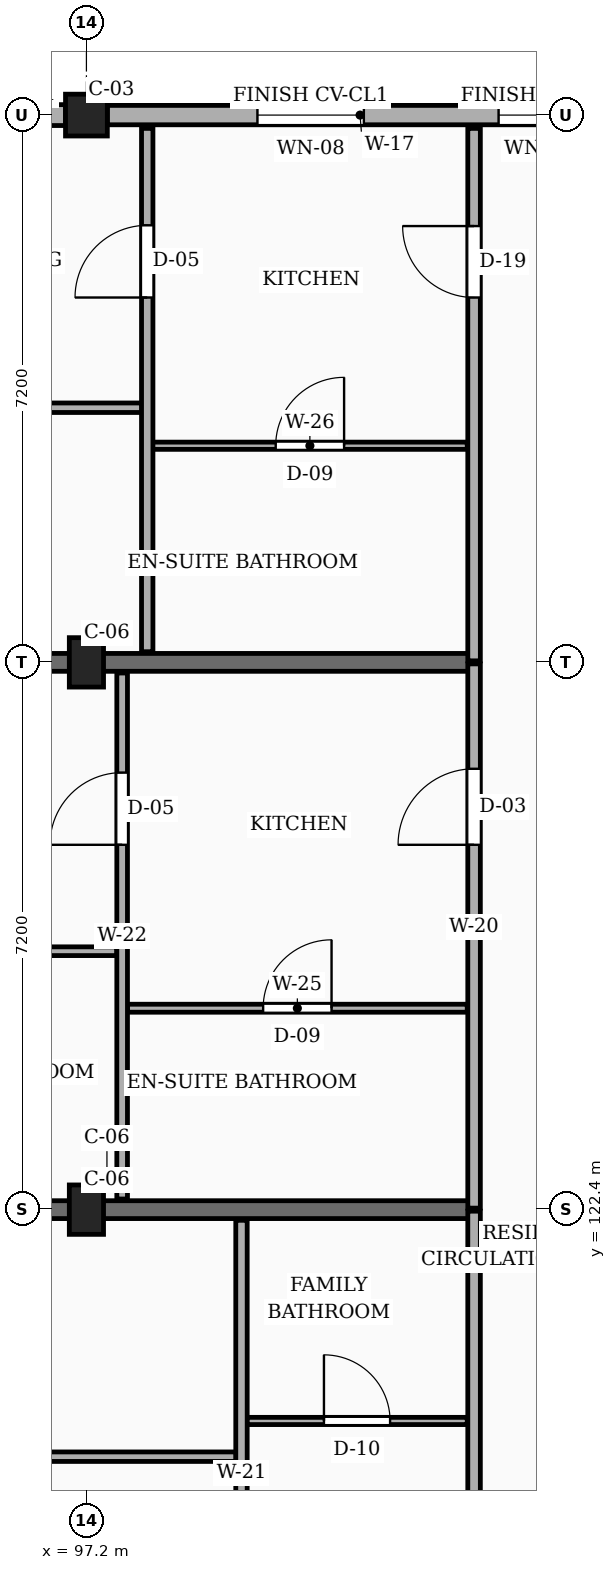
"""IFC4 building model, lengths in metres.
Left out: names, types, materials, properties, quantities, classifications, styles, units other than length and angle.
Written with IfcOpenShell. Run it as: python <this file> out.ifc"""

import sys

from ifc_helpers import new_model, si_unit, direction, frame, frame_2d, origin, origin_2d, place, context, subcontext, project, spatial, rectangle, extrude, element, fill, save


model = new_model("IFC4")
c1 = context("Model", 3, precision=1e-05, world=origin(), true_north=direction((0.0, 1.0)))
c2 = subcontext(c1, "Body", "Model", "MODEL_VIEW")
j1 = project(units=[si_unit("LENGTHUNIT", "METRE"), si_unit("PLANEANGLEUNIT", "RADIAN")], contexts=[c1])
p1 = place(None, origin())
s1 = spatial("IfcSite", under=j1, at=p1, CompositionType="ELEMENT")
p2 = place(p1, origin())
s2 = spatial("IfcBuilding", under=s1, at=p2, CompositionType="ELEMENT")
p3 = place(p2, frame((0.0, 0.0, 13.95)))
s3 = spatial("IfcBuildingStorey", under=s2, at=p3, CompositionType="ELEMENT", Elevation=13.95)
for number, where, z_axis, x_axis in (
    (1, (97.2, 122.4, 0.0), (0.0, 0.0, 1.0), (1.0, 0.0, 0.0)),
    (2, (97.2, 129.6, 0.0), (0.0, 0.0, 1.0), (1.0, 0.0, 0.0)),
):
    element("IfcColumn", number, at=place(p3, frame(where, z_axis=z_axis, x_axis=x_axis)), inside=s3, PredefinedType="COLUMN", context=c2, shape_type="SweptSolid", body=[
        extrude(rectangle(XDim=0.45, YDim=0.65, at=origin_2d()), origin(), (0.0, 0.0, 1.0), 3.15),
    ])
p4 = place(p3, frame((97.2, 136.8, 0.0), z_axis=(0.0, 0.0, 1.0), x_axis=(1.0, 0.0, 0.0)))
e3 = element("IfcColumn", 3, at=p4, inside=s3, PredefinedType="COLUMN", context=c2, shape_type="SweptSolid", body=[
    extrude(rectangle(XDim=0.55, YDim=0.55, at=origin_2d()), origin(), (0.0, 0.0, 1.0), 3.15),
])
for number, where, z_axis, x_axis in (
    (4, (90.275, 122.4, 0.0), (0.0, 0.0, 1.0), (1.0, 0.0, 0.0)),
    (5, (90.275, 129.6, 0.0), (0.0, 0.0, 1.0), (1.0, 0.0, 0.0)),
):
    element("IfcWall", number, at=place(p3, frame(where, z_axis=z_axis, x_axis=x_axis)), inside=s3, PredefinedType="SOLIDWALL", context=c2, shape_type="SweptSolid", body=[
        extrude(rectangle(XDim=12.025, YDim=0.235, at=frame_2d((6.013, 0.0))), origin(), (0.0, 0.0, 1.0), 2.19),
    ])
p5 = place(p3, frame((104.125, 136.8, 0.0), z_axis=(0.0, 0.0, 1.0), x_axis=(-1.0, 0.0, 0.0)))
e6 = element("IfcWall", 6, at=p5, inside=s3, PredefinedType="SOLIDWALL", context=c2, shape_type="SweptSolid", body=[
    extrude(rectangle(XDim=6.65, YDim=0.255, at=frame_2d((3.325, 0.0))), origin(), (0.0, 0.0, 1.0), 2.46),
])
p6 = place(p5, frame((0.462, 0.0, 0.78)))
e7 = element("IfcOpeningElement", 7, at=p6, cuts=e6, PredefinedType="OPENING", context=c2, shape_type="SweptSolid", body=[
    extrude(rectangle(XDim=1.04, YDim=1.26, at=frame_2d((0.52, 0.63))), frame((0.0, 0.137, 0.0), z_axis=(0.0, -1.0, 0.0), x_axis=(1.0, 0.0, 0.0)), (0.0, 0.0, 1.0), 0.275),
])
p7 = place(p5, frame((3.275, 0.0, 0.78)))
e8 = element("IfcOpeningElement", 8, at=p7, cuts=e6, PredefinedType="OPENING", context=c2, shape_type="SweptSolid", body=[
    extrude(rectangle(XDim=1.4, YDim=1.15, at=frame_2d((0.7, 0.575))), frame((0.0, 0.137, 0.0), z_axis=(0.0, -1.0, 0.0), x_axis=(1.0, 0.0, 0.0)), (0.0, 0.0, 1.0), 0.275),
])
p8 = place(p3, frame((96.925, 136.8, 0.0), z_axis=(0.0, 0.0, 1.0), x_axis=(-1.0, 0.0, 0.0)))
e9 = element("IfcWall", 9, at=p8, inside=s3, PredefinedType="SOLIDWALL", context=c2, shape_type="SweptSolid", body=[
    extrude(rectangle(XDim=6.65, YDim=0.275, at=frame_2d((3.325, 0.0))), origin(), (0.0, 0.0, 1.0), 2.46),
])
p9 = place(p8, frame((0.45, 0.0, 0.78)))
e10 = element("IfcOpeningElement", 10, at=p9, cuts=e9, PredefinedType="OPENING", context=c2, shape_type="SweptSolid", body=[
    extrude(rectangle(XDim=1.4, YDim=1.15, at=frame_2d((0.7, 0.575))), frame((0.0, 0.147, 0.0), z_axis=(0.0, -1.0, 0.0), x_axis=(1.0, 0.0, 0.0)), (0.0, 0.0, 1.0), 0.295),
])
p10 = place(p8, frame((4.65, 0.0, 0.78)))
e11 = element("IfcOpeningElement", 11, at=p10, cuts=e9, PredefinedType="OPENING", context=c2, shape_type="SweptSolid", body=[
    extrude(rectangle(XDim=0.96, YDim=1.26, at=frame_2d((0.48, 0.63))), frame((0.0, 0.147, 0.0), z_axis=(0.0, -1.0, 0.0), x_axis=(1.0, 0.0, 0.0)), (0.0, 0.0, 1.0), 0.295),
])
p11 = place(p3, frame((102.3, 115.22, 0.0), z_axis=(0.0, 0.0, 1.0), x_axis=(0.0, 1.0, 0.0)))
e12 = element("IfcWall", 12, at=p11, inside=s3, PredefinedType="PARTITIONING", context=c2, shape_type="SweptSolid", body=[
    extrude(rectangle(XDim=7.16, YDim=0.165, at=frame_2d((3.58, 0.0))), origin(), (0.0, 0.0, 1.0), 2.325),
])
p12 = place(p11, frame((1.33, 0.0, 0.0)))
e13 = element("IfcOpeningElement", 13, at=p12, cuts=e12, PredefinedType="OPENING", context=c2, shape_type="SweptSolid", body=[
    extrude(rectangle(XDim=1.14, YDim=2.18, at=frame_2d((0.57, 1.09))), frame((0.0, 0.093, 0.0), z_axis=(0.0, -1.0, 0.0), x_axis=(1.0, 0.0, 0.0)), (0.0, 0.0, 1.0), 0.185),
])
p13 = place(p3, frame((102.3, 122.42, 0.0), z_axis=(0.0, 0.0, 1.0), x_axis=(0.0, 1.0, 0.0)))
e14 = element("IfcWall", 14, at=p13, inside=s3, PredefinedType="PARTITIONING", context=c2, shape_type="SweptSolid", body=[
    extrude(rectangle(XDim=7.16, YDim=0.165, at=frame_2d((3.58, 0.0))), origin(), (0.0, 0.0, 1.0), 2.325),
])
p14 = place(p13, frame((4.78, 0.0, 0.0)))
e15 = element("IfcOpeningElement", 15, at=p14, cuts=e14, PredefinedType="OPENING", context=c2, shape_type="SweptSolid", body=[
    extrude(rectangle(XDim=1.0, YDim=2.15, at=frame_2d((0.5, 1.075))), frame((0.0, 0.093, 0.0), z_axis=(0.0, -1.0, 0.0), x_axis=(1.0, 0.0, 0.0)), (0.0, 0.0, 1.0), 0.185),
])
p15 = place(p3, frame((102.3, 129.62, 0.0), z_axis=(0.0, 0.0, 1.0), x_axis=(0.0, 1.0, 0.0)))
e16 = element("IfcWall", 16, at=p15, inside=s3, PredefinedType="PARTITIONING", context=c2, shape_type="SweptSolid", body=[
    extrude(rectangle(XDim=7.005, YDim=0.165, at=frame_2d((3.502, 0.0))), origin(), (0.0, 0.0, 1.0), 2.325),
])
p16 = place(p15, frame((4.78, 0.0, 0.0)))
e17 = element("IfcOpeningElement", 17, at=p16, cuts=e16, PredefinedType="OPENING", context=c2, shape_type="SweptSolid", body=[
    extrude(rectangle(XDim=0.94, YDim=2.12, at=frame_2d((0.47, 1.06))), frame((0.0, 0.093, 0.0), z_axis=(0.0, -1.0, 0.0), x_axis=(1.0, 0.0, 0.0)), (0.0, 0.0, 1.0), 0.185),
])
p17 = place(p3, frame((90.175, 119.15, 0.0), z_axis=(0.0, 0.0, 1.0), x_axis=(1.0, 0.0, 0.0)))
e18 = element("IfcWall", 18, at=p17, inside=s3, PredefinedType="PARTITIONING", context=c2, shape_type="SweptSolid", body=[
    extrude(rectangle(XDim=8.995, YDim=0.125, at=frame_2d((4.498, 0.0))), origin(), (0.0, 0.0, 1.0), 2.325),
])
p18 = place(p17, frame((4.058, 0.0, 0.0)))
e19 = element("IfcOpeningElement", 19, at=p18, cuts=e18, PredefinedType="OPENING", context=c2, shape_type="SweptSolid", body=[
    extrude(rectangle(XDim=0.88, YDim=2.08, at=frame_2d((0.44, 1.04))), frame((0.0, 0.073, 0.0), z_axis=(0.0, -1.0, 0.0), x_axis=(1.0, 0.0, 0.0)), (0.0, 0.0, 1.0), 0.145),
])
p19 = place(p3, frame((99.31, 119.62, 0.0), z_axis=(0.0, 0.0, 1.0), x_axis=(1.0, 0.0, 0.0)))
e20 = element("IfcWall", 20, at=p19, inside=s3, PredefinedType="PARTITIONING", context=c2, shape_type="SweptSolid", body=[
    extrude(rectangle(XDim=2.9, YDim=0.095, at=frame_2d((1.45, 0.0))), origin(), (0.0, 0.0, 1.0), 2.325),
])
p20 = place(p19, frame((1.015, 0.0, 0.0)))
e21 = element("IfcOpeningElement", 21, at=p20, cuts=e20, PredefinedType="OPENING", context=c2, shape_type="SweptSolid", body=[
    extrude(rectangle(XDim=0.87, YDim=2.05, at=frame_2d((0.435, 1.025))), frame((0.0, 0.058, 0.0), z_axis=(0.0, -1.0, 0.0), x_axis=(1.0, 0.0, 0.0)), (0.0, 0.0, 1.0), 0.115),
])
p21 = place(p3, frame((99.24, 115.34, 0.0), z_axis=(0.0, 0.0, 1.0), x_axis=(0.0, 1.0, 0.0)))
e22 = element("IfcWall", 22, at=p21, inside=s3, PredefinedType="PARTITIONING", context=c2, shape_type="SweptSolid", body=[
    extrude(rectangle(XDim=6.92, YDim=0.15, at=frame_2d((3.46, 0.0))), origin(), (0.0, 0.0, 1.0), 2.325),
])
p22 = place(p21, frame((1.31, 0.0, 0.0)))
e23 = element("IfcOpeningElement", 23, at=p22, cuts=e22, PredefinedType="OPENING", context=c2, shape_type="SweptSolid", body=[
    extrude(rectangle(XDim=0.92, YDim=2.1, at=frame_2d((0.46, 1.05))), frame((0.0, 0.085, 0.0), z_axis=(0.0, -1.0, 0.0), x_axis=(1.0, 0.0, 0.0)), (0.0, 0.0, 1.0), 0.17),
])
p23 = place(p3, frame((90.175, 125.8, 0.0), z_axis=(0.0, 0.0, 1.0), x_axis=(1.0, 0.0, 0.0)))
e24 = element("IfcWall", 24, at=p23, inside=s3, PredefinedType="PARTITIONING", context=c2, shape_type="SweptSolid", body=[
    extrude(rectangle(XDim=7.425, YDim=0.115, at=frame_2d((3.712, 0.0))), origin(), (0.0, 0.0, 1.0), 2.325),
])
p24 = place(p23, frame((3.262, 0.0, 0.0)))
e25 = element("IfcOpeningElement", 25, at=p24, cuts=e24, PredefinedType="OPENING", context=c2, shape_type="SweptSolid", body=[
    extrude(rectangle(XDim=0.9, YDim=2.1, at=frame_2d((0.45, 1.05))), frame((0.0, 0.067, 0.0), z_axis=(0.0, -1.0, 0.0), x_axis=(1.0, 0.0, 0.0)), (0.0, 0.0, 1.0), 0.135),
])
p25 = place(p3, frame((97.74, 125.05, 0.0), z_axis=(0.0, 0.0, 1.0), x_axis=(1.0, 0.0, 0.0)))
e26 = element("IfcWall", 26, at=p25, inside=s3, PredefinedType="PARTITIONING", context=c2, shape_type="SweptSolid", body=[
    extrude(rectangle(XDim=4.47, YDim=0.105, at=frame_2d((2.235, 0.0))), origin(), (0.0, 0.0, 1.0), 2.325),
])
p26 = place(p25, frame((1.785, 0.0, 0.0)))
e27 = element("IfcOpeningElement", 27, at=p26, cuts=e26, PredefinedType="OPENING", context=c2, shape_type="SweptSolid", body=[
    extrude(rectangle(XDim=0.9, YDim=2.05, at=frame_2d((0.45, 1.025))), frame((0.0, 0.062, 0.0), z_axis=(0.0, -1.0, 0.0), x_axis=(1.0, 0.0, 0.0)), (0.0, 0.0, 1.0), 0.125),
])
p27 = place(p3, frame((97.67, 122.54, 0.0), z_axis=(0.0, 0.0, 1.0), x_axis=(0.0, 1.0, 0.0)))
e28 = element("IfcWall", 28, at=p27, inside=s3, PredefinedType="PARTITIONING", context=c2, shape_type="SweptSolid", body=[
    extrude(rectangle(XDim=6.92, YDim=0.14, at=frame_2d((3.46, 0.0))), origin(), (0.0, 0.0, 1.0), 2.325),
])
p28 = place(p27, frame((4.66, 0.0, 0.0)))
e29 = element("IfcOpeningElement", 29, at=p28, cuts=e28, PredefinedType="OPENING", context=c2, shape_type="SweptSolid", body=[
    extrude(rectangle(XDim=0.95, YDim=2.1, at=frame_2d((0.475, 1.05))), frame((0.0, 0.08, 0.0), z_axis=(0.0, -1.0, 0.0), x_axis=(1.0, 0.0, 0.0)), (0.0, 0.0, 1.0), 0.16),
])
p29 = place(p3, frame((90.175, 132.95, 0.0), z_axis=(0.0, 0.0, 1.0), x_axis=(1.0, 0.0, 0.0)))
e30 = element("IfcWall", 30, at=p29, inside=s3, PredefinedType="PARTITIONING", context=c2, shape_type="SweptSolid", body=[
    extrude(rectangle(XDim=7.755, YDim=0.125, at=frame_2d((3.877, 0.0))), origin(), (0.0, 0.0, 1.0), 2.325),
])
p30 = place(p29, frame((3.427, 0.0, 0.0)))
e31 = element("IfcOpeningElement", 31, at=p30, cuts=e30, PredefinedType="OPENING", context=c2, shape_type="SweptSolid", body=[
    extrude(rectangle(XDim=0.9, YDim=2.1, at=frame_2d((0.45, 1.05))), frame((0.0, 0.073, 0.0), z_axis=(0.0, -1.0, 0.0), x_axis=(1.0, 0.0, 0.0)), (0.0, 0.0, 1.0), 0.145),
])
p31 = place(p3, frame((98.07, 132.45, 0.0), z_axis=(0.0, 0.0, 1.0), x_axis=(1.0, 0.0, 0.0)))
e32 = element("IfcWall", 32, at=p31, inside=s3, PredefinedType="PARTITIONING", context=c2, shape_type="SweptSolid", body=[
    extrude(rectangle(XDim=4.14, YDim=0.095, at=frame_2d((2.07, 0.0))), origin(), (0.0, 0.0, 1.0), 2.325),
])
p32 = place(p31, frame((1.62, 0.0, 0.0)))
e33 = element("IfcOpeningElement", 33, at=p32, cuts=e32, PredefinedType="OPENING", context=c2, shape_type="SweptSolid", body=[
    extrude(rectangle(XDim=0.9, YDim=2.05, at=frame_2d((0.45, 1.025))), frame((0.0, 0.058, 0.0), z_axis=(0.0, -1.0, 0.0), x_axis=(1.0, 0.0, 0.0)), (0.0, 0.0, 1.0), 0.115),
])
p33 = place(p3, frame((98.0, 129.74, 0.0), z_axis=(0.0, 0.0, 1.0), x_axis=(0.0, 1.0, 0.0)))
e34 = element("IfcWall", 34, at=p33, inside=s3, PredefinedType="PARTITIONING", context=c2, shape_type="SweptSolid", body=[
    extrude(rectangle(XDim=6.885, YDim=0.15, at=frame_2d((3.442, 0.0))), origin(), (0.0, 0.0, 1.0), 2.325),
])
p34 = place(p33, frame((4.66, 0.0, 0.0)))
e35 = element("IfcOpeningElement", 35, at=p34, cuts=e34, PredefinedType="OPENING", context=c2, shape_type="SweptSolid", body=[
    extrude(rectangle(XDim=0.95, YDim=2.1, at=frame_2d((0.475, 1.05))), frame((0.0, 0.085, 0.0), z_axis=(0.0, -1.0, 0.0), x_axis=(1.0, 0.0, 0.0)), (0.0, 0.0, 1.0), 0.17),
])
p35 = place(p6, origin())
e36 = element("IfcWindow", 36, at=p35, inside=s3, PartitioningType="SINGLE_PANEL", PredefinedType="WINDOW", context=c2, shape_type="SweptSolid", body=[
    extrude(rectangle(XDim=1.04, YDim=1.26, at=frame_2d((0.52, 0.63))), frame((0.0, 0.03, 0.0), z_axis=(0.0, -1.0, 0.0), x_axis=(1.0, 0.0, 0.0)), (0.0, 0.0, 1.0), 0.06),
])
fill(e7, e36)
p36 = place(p7, origin())
e37 = element("IfcWindow", 37, at=p36, inside=s3, PartitioningType="SINGLE_PANEL", PredefinedType="WINDOW", context=c2, shape_type="SweptSolid", body=[
    extrude(rectangle(XDim=1.4, YDim=1.15, at=frame_2d((0.7, 0.575))), frame((0.0, 0.03, 0.0), z_axis=(0.0, -1.0, 0.0), x_axis=(1.0, 0.0, 0.0)), (0.0, 0.0, 1.0), 0.06),
])
fill(e8, e37)
p37 = place(p14, origin())
e38 = element("IfcDoor", 38, at=p37, inside=s3, OperationType="SINGLE_SWING_LEFT", PredefinedType="DOOR", context=c2, shape_type="SweptSolid", body=[
    extrude(rectangle(XDim=1.0, YDim=2.15, at=frame_2d((0.5, 1.075))), frame((0.0, 0.025, 0.0), z_axis=(0.0, -1.0, 0.0), x_axis=(1.0, 0.0, 0.0)), (0.0, 0.0, 1.0), 0.05),
])
fill(e15, e38)
p38 = place(p16, origin())
e39 = element("IfcDoor", 39, at=p38, inside=s3, OperationType="SINGLE_SWING_RIGHT", PredefinedType="DOOR", context=c2, shape_type="SweptSolid", body=[
    extrude(rectangle(XDim=0.94, YDim=2.12, at=frame_2d((0.47, 1.06))), frame((0.0, 0.025, 0.0), z_axis=(0.0, -1.0, 0.0), x_axis=(1.0, 0.0, 0.0)), (0.0, 0.0, 1.0), 0.05),
])
fill(e17, e39)
p39 = place(p20, origin())
e40 = element("IfcDoor", 40, at=p39, inside=s3, OperationType="SINGLE_SWING_LEFT", PredefinedType="DOOR", context=c2, shape_type="SweptSolid", body=[
    extrude(rectangle(XDim=0.87, YDim=2.05, at=frame_2d((0.435, 1.025))), frame((0.0, 0.025, 0.0), z_axis=(0.0, -1.0, 0.0), x_axis=(1.0, 0.0, 0.0)), (0.0, 0.0, 1.0), 0.05),
])
fill(e21, e40)
p40 = place(p26, origin())
e41 = element("IfcDoor", 41, at=p40, inside=s3, OperationType="SINGLE_SWING_RIGHT", PredefinedType="DOOR", context=c2, shape_type="SweptSolid", body=[
    extrude(rectangle(XDim=0.9, YDim=2.05, at=frame_2d((0.45, 1.025))), frame((0.0, 0.025, 0.0), z_axis=(0.0, -1.0, 0.0), x_axis=(1.0, 0.0, 0.0)), (0.0, 0.0, 1.0), 0.05),
])
fill(e27, e41)
p41 = place(p28, origin())
e42 = element("IfcDoor", 42, at=p41, inside=s3, OperationType="SINGLE_SWING_LEFT", PredefinedType="DOOR", context=c2, shape_type="SweptSolid", body=[
    extrude(rectangle(XDim=0.95, YDim=2.1, at=frame_2d((0.475, 1.05))), frame((0.0, 0.025, 0.0), z_axis=(0.0, -1.0, 0.0), x_axis=(1.0, 0.0, 0.0)), (0.0, 0.0, 1.0), 0.05),
])
fill(e29, e42)
p42 = place(p32, origin())
e43 = element("IfcDoor", 43, at=p42, inside=s3, OperationType="SINGLE_SWING_RIGHT", PredefinedType="DOOR", context=c2, shape_type="SweptSolid", body=[
    extrude(rectangle(XDim=0.9, YDim=2.05, at=frame_2d((0.45, 1.025))), frame((0.0, 0.025, 0.0), z_axis=(0.0, -1.0, 0.0), x_axis=(1.0, 0.0, 0.0)), (0.0, 0.0, 1.0), 0.05),
])
fill(e33, e43)
p43 = place(p34, origin())
e44 = element("IfcDoor", 44, at=p43, inside=s3, OperationType="SINGLE_SWING_LEFT", PredefinedType="DOOR", context=c2, shape_type="SweptSolid", body=[
    extrude(rectangle(XDim=0.95, YDim=2.1, at=frame_2d((0.475, 1.05))), frame((0.0, 0.025, 0.0), z_axis=(0.0, -1.0, 0.0), x_axis=(1.0, 0.0, 0.0)), (0.0, 0.0, 1.0), 0.05),
])
fill(e35, e44)
save(model, sys.argv[1])
